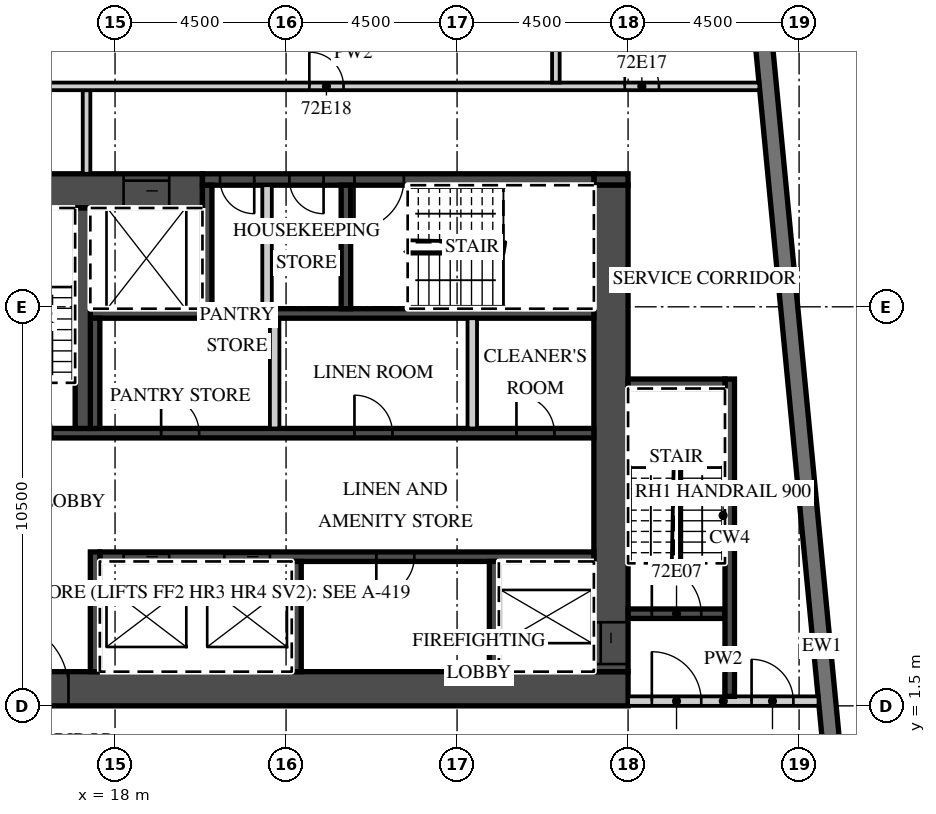
"""IFC4 building model, lengths in metres.
Left out: names, types, materials, properties, quantities, classifications, styles, units other than length and angle.
Written with IfcOpenShell. Run it as: python <this file> out.ifc"""

import sys

from ifc_helpers import new_model, si_unit, direction, frame, frame_2d, origin, place, context, subcontext, project, spatial, rectangle, extrude, element, fill, save


model = new_model("IFC4")
c1 = context("Model", 3, precision=1e-05, world=origin(), true_north=direction((0.0, 1.0)))
c2 = subcontext(c1, "Body", "Model", "MODEL_VIEW")
j1 = project(units=[si_unit("LENGTHUNIT", "METRE"), si_unit("PLANEANGLEUNIT", "RADIAN")], contexts=[c1])
p1 = place(None, origin())
s1 = spatial("IfcSite", under=j1, at=p1, CompositionType="ELEMENT")
p2 = place(p1, origin())
s2 = spatial("IfcBuilding", under=s1, at=p2, CompositionType="ELEMENT")
p3 = place(p2, frame((0.0, 0.0, 288.3)))
s3 = spatial("IfcBuildingStorey", under=s2, at=p3, CompositionType="ELEMENT", Elevation=288.3)
p4 = place(p3, frame((38.132, -12.858, 0.0), z_axis=(0.0, 0.0, 1.0), x_axis=(-0.095847749461, 0.995396006082, 0.0)))
e1 = element("IfcWall", 1, at=p4, inside=s3, PredefinedType="SOLIDWALL", context=c2, shape_type="SweptSolid", body=[
    extrude(rectangle(XDim=32.0, YDim=0.45, at=frame_2d((16.0, 0.0))), origin(), (0.0, 0.0, 1.0), 3.02),
])
p5 = place(p3, frame((13.5, 1.95, 0.0), z_axis=(0.0, 0.0, 1.0), x_axis=(1.0, 0.0, 0.0)))
e2 = element("IfcWall", 2, at=p5, inside=s3, PredefinedType="SHEAR", context=c2, shape_type="SweptSolid", body=[
    extrude(rectangle(XDim=18.0, YDim=0.9, at=frame_2d((9.0, 0.0))), origin(), (0.0, 0.0, 1.0), 3.02),
])
p6 = place(p5, frame((1.475, 0.0, 0.0)))
e3 = element("IfcOpeningElement", 3, at=p6, cuts=e2, PredefinedType="OPENING", context=c2, shape_type="SweptSolid", body=[
    extrude(rectangle(XDim=1.8, YDim=2.1, at=frame_2d((0.9, 1.05))), frame((0.0, 0.46, 0.0), z_axis=(0.0, -1.0, 0.0), x_axis=(1.0, 0.0, 0.0)), (0.0, 0.0, 1.0), 0.92),
])
p7 = place(p3, frame((13.5, 15.05, 0.0), z_axis=(0.0, 0.0, 1.0), x_axis=(1.0, 0.0, 0.0)))
e4 = element("IfcWall", 4, at=p7, inside=s3, PredefinedType="SHEAR", context=c2, shape_type="SweptSolid", body=[
    extrude(rectangle(XDim=6.8, YDim=0.9, at=frame_2d((3.4, 0.0))), origin(), (0.0, 0.0, 1.0), 3.02),
])
p8 = place(p7, frame((4.725, 0.0, 0.0)))
e5 = element("IfcOpeningElement", 5, at=p8, cuts=e4, PredefinedType="OPENING", context=c2, shape_type="SweptSolid", body=[
    extrude(rectangle(XDim=1.2, YDim=2.1, at=frame_2d((0.6, 1.05))), frame((0.0, 0.46, 0.0), z_axis=(0.0, -1.0, 0.0), x_axis=(1.0, 0.0, 0.0)), (0.0, 0.0, 1.0), 0.92),
])
p9 = place(p3, frame((30.6, 15.35, 0.0), z_axis=(0.0, 0.0, 1.0), x_axis=(1.0, 0.0, 0.0)))
e6 = element("IfcWall", 6, at=p9, inside=s3, PredefinedType="SHEAR", context=c2, shape_type="SweptSolid", body=[
    extrude(rectangle(XDim=0.9, YDim=0.3, at=frame_2d((0.45, 0.0))), origin(), (0.0, 0.0, 1.0), 3.02),
])
p10 = place(p3, frame((20.3, 15.35, 0.0), z_axis=(0.0, 0.0, 1.0), x_axis=(1.0, 0.0, 0.0)))
e7 = element("IfcWall", 7, at=p10, inside=s3, PredefinedType="SHEAR", context=c2, shape_type="SweptSolid", body=[
    extrude(rectangle(XDim=10.3, YDim=0.3, at=frame_2d((5.15, 0.0))), origin(), (0.0, 0.0, 1.0), 3.02),
])
p11 = place(p10, frame((4.0, 0.0, 0.0)))
e8 = element("IfcOpeningElement", 8, at=p11, cuts=e7, PredefinedType="OPENING", context=c2, shape_type="SweptSolid", body=[
    extrude(rectangle(XDim=1.3, YDim=2.1, at=frame_2d((0.65, 1.05))), frame((0.0, 0.16, 0.0), z_axis=(0.0, -1.0, 0.0), x_axis=(1.0, 0.0, 0.0)), (0.0, 0.0, 1.0), 0.32),
])
p12 = place(p10, frame((2.288, 0.0, 0.0)))
e9 = element("IfcOpeningElement", 9, at=p12, cuts=e7, PredefinedType="OPENING", context=c2, shape_type="SweptSolid", body=[
    extrude(rectangle(XDim=0.9, YDim=2.1, at=frame_2d((0.45, 1.05))), frame((0.0, 0.16, 0.0), z_axis=(0.0, -1.0, 0.0), x_axis=(1.0, 0.0, 0.0)), (0.0, 0.0, 1.0), 0.32),
])
p13 = place(p10, frame((0.462, 0.0, 0.0)))
e10 = element("IfcOpeningElement", 10, at=p13, cuts=e7, PredefinedType="OPENING", context=c2, shape_type="SweptSolid", body=[
    extrude(rectangle(XDim=0.9, YDim=2.1, at=frame_2d((0.45, 1.05))), frame((0.0, 0.16, 0.0), z_axis=(0.0, -1.0, 0.0), x_axis=(1.0, 0.0, 0.0)), (0.0, 0.0, 1.0), 0.32),
])
p14 = place(p3, frame((31.05, 2.4, 0.0), z_axis=(0.0, 0.0, 1.0), x_axis=(0.0, 1.0, 0.0)))
e11 = element("IfcWall", 11, at=p14, inside=s3, PredefinedType="SHEAR", context=c2, shape_type="SweptSolid", body=[
    extrude(rectangle(XDim=12.8, YDim=0.9, at=frame_2d((6.4, 0.0))), origin(), (0.0, 0.0, 1.0), 3.02),
])
p15 = place(p14, frame((0.2, 0.0, 0.0)))
e12 = element("IfcOpeningElement", 12, at=p15, cuts=e11, PredefinedType="OPENING", context=c2, shape_type="SweptSolid", body=[
    extrude(rectangle(XDim=1.1, YDim=2.1, at=frame_2d((0.55, 1.05))), frame((0.0, 0.46, 0.0), z_axis=(0.0, -1.0, 0.0), x_axis=(1.0, 0.0, 0.0)), (0.0, 0.0, 1.0), 0.92),
])
p16 = place(p3, frame((17.6, 5.425, 0.0), z_axis=(0.0, 0.0, 1.0), x_axis=(1.0, 0.0, 0.0)))
e13 = element("IfcWall", 13, at=p16, inside=s3, PredefinedType="SHEAR", context=c2, shape_type="SweptSolid", body=[
    extrude(rectangle(XDim=13.0, YDim=0.25, at=frame_2d((6.5, 0.0))), origin(), (0.0, 0.0, 1.0), 3.02),
])
p17 = place(p16, frame((3.275, 0.0, 0.0)))
e14 = element("IfcOpeningElement", 14, at=p17, cuts=e13, PredefinedType="OPENING", context=c2, shape_type="SweptSolid", body=[
    extrude(rectangle(XDim=1.2, YDim=2.1, at=frame_2d((0.6, 1.05))), frame((0.0, 0.135, 0.0), z_axis=(0.0, -1.0, 0.0), x_axis=(1.0, 0.0, 0.0)), (0.0, 0.0, 1.0), 0.27),
])
p18 = place(p16, frame((0.625, 0.0, 0.0)))
e15 = element("IfcOpeningElement", 15, at=p18, cuts=e13, PredefinedType="OPENING", context=c2, shape_type="SweptSolid", body=[
    extrude(rectangle(XDim=1.2, YDim=2.1, at=frame_2d((0.6, 1.05))), frame((0.0, 0.135, 0.0), z_axis=(0.0, -1.0, 0.0), x_axis=(1.0, 0.0, 0.0)), (0.0, 0.0, 1.0), 0.27),
])
p19 = place(p16, frame((7.275, 0.0, 0.0)))
e16 = element("IfcOpeningElement", 16, at=p19, cuts=e13, PredefinedType="OPENING", context=c2, shape_type="SweptSolid", body=[
    extrude(rectangle(XDim=1.0, YDim=2.1, at=frame_2d((0.5, 1.05))), frame((0.0, 0.135, 0.0), z_axis=(0.0, -1.0, 0.0), x_axis=(1.0, 0.0, 0.0)), (0.0, 0.0, 1.0), 0.27),
])
p20 = place(p3, frame((17.475, 2.4, 0.0), z_axis=(0.0, 0.0, 1.0), x_axis=(0.0, 1.0, 0.0)))
e17 = element("IfcWall", 17, at=p20, inside=s3, PredefinedType="SHEAR", context=c2, shape_type="SweptSolid", body=[
    extrude(rectangle(XDim=3.15, YDim=0.25, at=frame_2d((1.575, 0.0))), origin(), (0.0, 0.0, 1.0), 3.02),
])
for number, where, z_axis, x_axis in (
    (18, (27.975, 2.4, 0.0), (0.0, 0.0, 1.0), (0.0, 1.0, 0.0)),
    (19, (22.775, 2.4, 0.0), (0.0, 0.0, 1.0), (0.0, 1.0, 0.0)),
):
    element("IfcWall", number, at=place(p3, frame(where, z_axis=z_axis, x_axis=x_axis)), inside=s3, PredefinedType="SHEAR", context=c2, shape_type="SweptSolid", body=[
        extrude(rectangle(XDim=2.9, YDim=0.25, at=frame_2d((1.45, 0.0))), origin(), (0.0, 0.0, 1.0), 3.02),
    ])
p21 = place(p3, frame((14.4, 8.675, 0.0), z_axis=(0.0, 0.0, 1.0), x_axis=(1.0, 0.0, 0.0)))
e20 = element("IfcWall", 20, at=p21, inside=s3, PredefinedType="SHEAR", context=c2, shape_type="SweptSolid", body=[
    extrude(rectangle(XDim=16.2, YDim=0.25, at=frame_2d((8.1, 0.0))), origin(), (0.0, 0.0, 1.0), 3.02),
])
p22 = place(p21, frame((0.65, 0.0, 0.0)))
e21 = element("IfcOpeningElement", 21, at=p22, cuts=e20, PredefinedType="OPENING", context=c2, shape_type="SweptSolid", body=[
    extrude(rectangle(XDim=1.3, YDim=2.1, at=frame_2d((0.65, 1.05))), frame((0.0, 0.135, 0.0), z_axis=(0.0, -1.0, 0.0), x_axis=(1.0, 0.0, 0.0)), (0.0, 0.0, 1.0), 0.27),
])
p23 = place(p21, frame((14.163, 0.0, 0.0)))
e22 = element("IfcOpeningElement", 22, at=p23, cuts=e20, PredefinedType="OPENING", context=c2, shape_type="SweptSolid", body=[
    extrude(rectangle(XDim=1.0, YDim=2.1, at=frame_2d((0.5, 1.05))), frame((0.0, 0.135, 0.0), z_axis=(0.0, -1.0, 0.0), x_axis=(1.0, 0.0, 0.0)), (0.0, 0.0, 1.0), 0.27),
])
p24 = place(p21, frame((9.9, 0.0, 0.0)))
e23 = element("IfcOpeningElement", 23, at=p24, cuts=e20, PredefinedType="OPENING", context=c2, shape_type="SweptSolid", body=[
    extrude(rectangle(XDim=1.0, YDim=2.1, at=frame_2d((0.5, 1.05))), frame((0.0, 0.135, 0.0), z_axis=(0.0, -1.0, 0.0), x_axis=(1.0, 0.0, 0.0)), (0.0, 0.0, 1.0), 0.27),
])
p25 = place(p21, frame((4.812, 0.0, 0.0)))
e24 = element("IfcOpeningElement", 24, at=p25, cuts=e20, PredefinedType="OPENING", context=c2, shape_type="SweptSolid", body=[
    extrude(rectangle(XDim=1.0, YDim=2.1, at=frame_2d((0.5, 1.05))), frame((0.0, 0.135, 0.0), z_axis=(0.0, -1.0, 0.0), x_axis=(1.0, 0.0, 0.0)), (0.0, 0.0, 1.0), 0.27),
])
p26 = place(p3, frame((17.35, 11.825, 0.0), z_axis=(0.0, 0.0, 1.0), x_axis=(1.0, 0.0, 0.0)))
e25 = element("IfcWall", 25, at=p26, inside=s3, PredefinedType="SHEAR", context=c2, shape_type="SweptSolid", body=[
    extrude(rectangle(XDim=13.25, YDim=0.25, at=frame_2d((6.625, 0.0))), origin(), (0.0, 0.0, 1.0), 3.02),
])
p27 = place(p3, frame((17.475, 8.8, 0.0), z_axis=(0.0, 0.0, 1.0), x_axis=(0.0, 1.0, 0.0)))
e26 = element("IfcWall", 26, at=p27, inside=s3, PredefinedType="SHEAR", context=c2, shape_type="SweptSolid", body=[
    extrude(rectangle(XDim=2.9, YDim=0.25, at=frame_2d((1.45, 0.0))), origin(), (0.0, 0.0, 1.0), 3.02),
])
for number, where, z_axis, x_axis in (
    (27, (27.4, 8.8, 0.0), (0.0, 0.0, 1.0), (0.0, 1.0, 0.0)),
    (28, (22.2, 8.8, 0.0), (0.0, 0.0, 1.0), (0.0, 1.0, 0.0)),
):
    element("IfcWall", number, at=place(p3, frame(where, z_axis=z_axis, x_axis=x_axis)), inside=s3, PredefinedType="PARTITIONING", context=c2, shape_type="SweptSolid", body=[
        extrude(rectangle(XDim=2.9, YDim=0.25, at=frame_2d((1.45, 0.0))), origin(), (0.0, 0.0, 1.0), 3.02),
    ])
p28 = place(p3, frame((17.15, 8.8, 0.0), z_axis=(0.0, 0.0, 1.0), x_axis=(0.0, 1.0, 0.0)))
e29 = element("IfcWall", 29, at=p28, inside=s3, PredefinedType="SHEAR", context=c2, shape_type="SweptSolid", body=[
    extrude(rectangle(XDim=5.8, YDim=0.4, at=frame_2d((2.9, 0.0))), origin(), (0.0, 0.0, 1.0), 3.02),
])
for number, where, z_axis, x_axis in (
    (30, (20.425, 11.95, 0.0), (0.0, 0.0, 1.0), (0.0, 1.0, 0.0)),
    (31, (24.075, 11.95, 0.0), (0.0, 0.0, 1.0), (0.0, 1.0, 0.0)),
):
    element("IfcWall", number, at=place(p3, frame(where, z_axis=z_axis, x_axis=x_axis)), inside=s3, PredefinedType="SHEAR", context=c2, shape_type="SweptSolid", body=[
        extrude(rectangle(XDim=3.25, YDim=0.25, at=frame_2d((1.625, 0.0))), origin(), (0.0, 0.0, 1.0), 3.02),
    ])
p29 = place(p3, frame((22.0, 11.95, 0.0), z_axis=(0.0, 0.0, 1.0), x_axis=(0.0, 1.0, 0.0)))
e32 = element("IfcWall", 32, at=p29, inside=s3, PredefinedType="PARTITIONING", context=c2, shape_type="SweptSolid", body=[
    extrude(rectangle(XDim=3.25, YDim=0.25, at=frame_2d((1.625, 0.0))), origin(), (0.0, 0.0, 1.0), 3.02),
])
p30 = place(p3, frame((31.5, 1.625, 0.0), z_axis=(0.0, 0.0, 1.0), x_axis=(1.0, 0.0, 0.0)))
e33 = element("IfcWall", 33, at=p30, inside=s3, PredefinedType="PARTITIONING", context=c2, shape_type="SweptSolid", body=[
    extrude(rectangle(XDim=5.012, YDim=0.25, at=frame_2d((2.506, 0.0))), origin(), (0.0, 0.0, 1.0), 3.02),
])
p31 = place(p30, frame((0.625, 0.0, 0.0)))
e34 = element("IfcOpeningElement", 34, at=p31, cuts=e33, PredefinedType="OPENING", context=c2, shape_type="SweptSolid", body=[
    extrude(rectangle(XDim=1.3, YDim=2.1, at=frame_2d((0.65, 1.05))), frame((0.0, 0.135, 0.0), z_axis=(0.0, -1.0, 0.0), x_axis=(1.0, 0.0, 0.0)), (0.0, 0.0, 1.0), 0.27),
])
p32 = place(p30, frame((3.25, 0.0, 0.0)))
e35 = element("IfcOpeningElement", 35, at=p32, cuts=e33, PredefinedType="OPENING", context=c2, shape_type="SweptSolid", body=[
    extrude(rectangle(XDim=1.1, YDim=2.1, at=frame_2d((0.55, 1.05))), frame((0.0, 0.135, 0.0), z_axis=(0.0, -1.0, 0.0), x_axis=(1.0, 0.0, 0.0)), (0.0, 0.0, 1.0), 0.27),
])
p33 = place(p3, frame((31.5, 3.925, 0.0), z_axis=(0.0, 0.0, 1.0), x_axis=(1.0, 0.0, 0.0)))
e36 = element("IfcWall", 36, at=p33, inside=s3, PredefinedType="SHEAR", context=c2, shape_type="SweptSolid", body=[
    extrude(rectangle(XDim=2.55, YDim=0.25, at=frame_2d((1.275, 0.0))), origin(), (0.0, 0.0, 1.0), 3.02),
])
p34 = place(p33, frame((0.625, 0.0, 0.0)))
e37 = element("IfcOpeningElement", 37, at=p34, cuts=e36, PredefinedType="OPENING", context=c2, shape_type="SweptSolid", body=[
    extrude(rectangle(XDim=1.3, YDim=2.1, at=frame_2d((0.65, 1.05))), frame((0.0, 0.135, 0.0), z_axis=(0.0, -1.0, 0.0), x_axis=(1.0, 0.0, 0.0)), (0.0, 0.0, 1.0), 0.27),
])
p35 = place(p3, frame((34.175, 1.75, 0.0), z_axis=(0.0, 0.0, 1.0), x_axis=(0.0, 1.0, 0.0)))
e38 = element("IfcWall", 38, at=p35, inside=s3, PredefinedType="SHEAR", context=c2, shape_type="SweptSolid", body=[
    extrude(rectangle(XDim=8.35, YDim=0.25, at=frame_2d((4.175, 0.0))), origin(), (0.0, 0.0, 1.0), 3.02),
])
p36 = place(p3, frame((31.5, 9.975, 0.0), z_axis=(0.0, 0.0, 1.0), x_axis=(1.0, 0.0, 0.0)))
e39 = element("IfcWall", 39, at=p36, inside=s3, PredefinedType="SHEAR", context=c2, shape_type="SweptSolid", body=[
    extrude(rectangle(XDim=2.55, YDim=0.25, at=frame_2d((1.275, 0.0))), origin(), (0.0, 0.0, 1.0), 3.02),
])
p37 = place(p3, frame((17.25, 15.5, 0.0), z_axis=(0.0, 0.0, 1.0), x_axis=(0.0, 1.0, 0.0)))
e40 = element("IfcWall", 40, at=p37, inside=s3, PredefinedType="PARTITIONING", context=c2, shape_type="SweptSolid", body=[
    extrude(rectangle(XDim=2.2, YDim=0.2, at=frame_2d((1.1, 0.0))), origin(), (0.0, 0.0, 1.0), 3.02),
])
p38 = place(p3, frame((13.6, 17.8, 0.0), z_axis=(0.0, 0.0, 1.0), x_axis=(1.0, 0.0, 0.0)))
e41 = element("IfcWall", 41, at=p38, inside=s3, PredefinedType="PARTITIONING", context=c2, shape_type="SweptSolid", body=[
    extrude(rectangle(XDim=21.354, YDim=0.2, at=frame_2d((10.677, 0.0))), origin(), (0.0, 0.0, 1.0), 3.02),
])
p39 = place(p38, frame((17.812, 0.0, 0.0)))
e42 = element("IfcOpeningElement", 42, at=p39, cuts=e41, PredefinedType="OPENING", context=c2, shape_type="SweptSolid", body=[
    extrude(rectangle(XDim=0.9, YDim=2.1, at=frame_2d((0.45, 1.05))), frame((0.0, 0.11, 0.0), z_axis=(0.0, -1.0, 0.0), x_axis=(1.0, 0.0, 0.0)), (0.0, 0.0, 1.0), 0.22),
])
p40 = place(p38, frame((9.512, 0.0, 0.0)))
e43 = element("IfcOpeningElement", 43, at=p40, cuts=e41, PredefinedType="OPENING", context=c2, shape_type="SweptSolid", body=[
    extrude(rectangle(XDim=0.9, YDim=2.1, at=frame_2d((0.45, 1.05))), frame((0.0, 0.11, 0.0), z_axis=(0.0, -1.0, 0.0), x_axis=(1.0, 0.0, 0.0)), (0.0, 0.0, 1.0), 0.22),
])
p41 = place(p3, frame((29.6, 17.9, 0.0), z_axis=(0.0, 0.0, 1.0), x_axis=(0.0, 1.0, 0.0)))
e44 = element("IfcWall", 44, at=p41, inside=s3, PredefinedType="PARTITIONING", context=c2, shape_type="SweptSolid", body=[
    extrude(rectangle(XDim=4.136, YDim=0.2, at=frame_2d((2.068, 0.0))), origin(), (0.0, 0.0, 1.0), 3.02),
])
p42 = place(p17, origin())
e45 = element("IfcDoor", 45, at=p42, inside=s3, OperationType="SLIDING_TO_RIGHT", PredefinedType="DOOR", context=c2, shape_type="SweptSolid", body=[
    extrude(rectangle(XDim=1.2, YDim=2.1, at=frame_2d((0.6, 1.05))), frame((0.0, 0.025, 0.0), z_axis=(0.0, -1.0, 0.0), x_axis=(1.0, 0.0, 0.0)), (0.0, 0.0, 1.0), 0.05),
])
fill(e14, e45)
p43 = place(p18, origin())
e46 = element("IfcDoor", 46, at=p43, inside=s3, OperationType="SLIDING_TO_LEFT", PredefinedType="DOOR", context=c2, shape_type="SweptSolid", body=[
    extrude(rectangle(XDim=1.2, YDim=2.1, at=frame_2d((0.6, 1.05))), frame((0.0, 0.025, 0.0), z_axis=(0.0, -1.0, 0.0), x_axis=(1.0, 0.0, 0.0)), (0.0, 0.0, 1.0), 0.05),
])
fill(e15, e46)
p44 = place(p8, origin())
e47 = element("IfcDoor", 47, at=p44, inside=s3, OperationType="SLIDING_TO_LEFT", PredefinedType="DOOR", context=c2, shape_type="SweptSolid", body=[
    extrude(rectangle(XDim=1.2, YDim=2.1, at=frame_2d((0.6, 1.05))), frame((0.0, 0.025, 0.0), z_axis=(0.0, -1.0, 0.0), x_axis=(1.0, 0.0, 0.0)), (0.0, 0.0, 1.0), 0.05),
])
fill(e5, e47)
p45 = place(p15, origin())
e48 = element("IfcDoor", 48, at=p45, inside=s3, OperationType="SLIDING_TO_LEFT", PredefinedType="DOOR", context=c2, shape_type="SweptSolid", body=[
    extrude(rectangle(XDim=1.1, YDim=2.1, at=frame_2d((0.55, 1.05))), frame((0.0, 0.025, 0.0), z_axis=(0.0, -1.0, 0.0), x_axis=(1.0, 0.0, 0.0)), (0.0, 0.0, 1.0), 0.05),
])
fill(e12, e48)
p46 = place(p6, origin())
e49 = element("IfcDoor", 49, at=p46, inside=s3, OperationType="DOUBLE_DOOR_DOUBLE_SWING", PredefinedType="DOOR", context=c2, shape_type="SweptSolid", body=[
    extrude(rectangle(XDim=1.8, YDim=2.1, at=frame_2d((0.9, 1.05))), frame((0.0, 0.025, 0.0), z_axis=(0.0, -1.0, 0.0), x_axis=(1.0, 0.0, 0.0)), (0.0, 0.0, 1.0), 0.05),
])
fill(e3, e49)
p47 = place(p31, origin())
e50 = element("IfcDoor", 50, at=p47, inside=s3, OperationType="SINGLE_SWING_LEFT", PredefinedType="DOOR", context=c2, shape_type="SweptSolid", body=[
    extrude(rectangle(XDim=1.3, YDim=2.1, at=frame_2d((0.65, 1.05))), frame((0.0, 0.025, 0.0), z_axis=(0.0, -1.0, 0.0), x_axis=(1.0, 0.0, 0.0)), (0.0, 0.0, 1.0), 0.05),
])
fill(e34, e50)
p48 = place(p34, origin())
e51 = element("IfcDoor", 51, at=p48, inside=s3, OperationType="SINGLE_SWING_LEFT", PredefinedType="DOOR", context=c2, shape_type="SweptSolid", body=[
    extrude(rectangle(XDim=1.3, YDim=2.1, at=frame_2d((0.65, 1.05))), frame((0.0, 0.025, 0.0), z_axis=(0.0, -1.0, 0.0), x_axis=(1.0, 0.0, 0.0)), (0.0, 0.0, 1.0), 0.05),
])
fill(e37, e51)
p49 = place(p32, origin())
e52 = element("IfcDoor", 52, at=p49, inside=s3, OperationType="SINGLE_SWING_LEFT", PredefinedType="DOOR", context=c2, shape_type="SweptSolid", body=[
    extrude(rectangle(XDim=1.1, YDim=2.1, at=frame_2d((0.55, 1.05))), frame((0.0, 0.025, 0.0), z_axis=(0.0, -1.0, 0.0), x_axis=(1.0, 0.0, 0.0)), (0.0, 0.0, 1.0), 0.05),
])
fill(e35, e52)
p50 = place(p11, origin())
e53 = element("IfcDoor", 53, at=p50, inside=s3, OperationType="SINGLE_SWING_LEFT", PredefinedType="DOOR", context=c2, shape_type="SweptSolid", body=[
    extrude(rectangle(XDim=1.3, YDim=2.1, at=frame_2d((0.65, 1.05))), frame((0.0, 0.025, 0.0), z_axis=(0.0, -1.0, 0.0), x_axis=(1.0, 0.0, 0.0)), (0.0, 0.0, 1.0), 0.05),
])
fill(e8, e53)
p51 = place(p12, origin())
e54 = element("IfcDoor", 54, at=p51, inside=s3, OperationType="SINGLE_SWING_RIGHT", PredefinedType="DOOR", context=c2, shape_type="SweptSolid", body=[
    extrude(rectangle(XDim=0.9, YDim=2.1, at=frame_2d((0.45, 1.05))), frame((0.0, 0.025, 0.0), z_axis=(0.0, -1.0, 0.0), x_axis=(1.0, 0.0, 0.0)), (0.0, 0.0, 1.0), 0.05),
])
fill(e9, e54)
p52 = place(p13, origin())
e55 = element("IfcDoor", 55, at=p52, inside=s3, OperationType="SINGLE_SWING_RIGHT", PredefinedType="DOOR", context=c2, shape_type="SweptSolid", body=[
    extrude(rectangle(XDim=0.9, YDim=2.1, at=frame_2d((0.45, 1.05))), frame((0.0, 0.025, 0.0), z_axis=(0.0, -1.0, 0.0), x_axis=(1.0, 0.0, 0.0)), (0.0, 0.0, 1.0), 0.05),
])
fill(e10, e55)
p53 = place(p23, origin())
e56 = element("IfcDoor", 56, at=p53, inside=s3, OperationType="SINGLE_SWING_LEFT", PredefinedType="DOOR", context=c2, shape_type="SweptSolid", body=[
    extrude(rectangle(XDim=1.0, YDim=2.1, at=frame_2d((0.5, 1.05))), frame((0.0, 0.025, 0.0), z_axis=(0.0, -1.0, 0.0), x_axis=(1.0, 0.0, 0.0)), (0.0, 0.0, 1.0), 0.05),
])
fill(e22, e56)
p54 = place(p24, origin())
e57 = element("IfcDoor", 57, at=p54, inside=s3, OperationType="SINGLE_SWING_LEFT", PredefinedType="DOOR", context=c2, shape_type="SweptSolid", body=[
    extrude(rectangle(XDim=1.0, YDim=2.1, at=frame_2d((0.5, 1.05))), frame((0.0, 0.025, 0.0), z_axis=(0.0, -1.0, 0.0), x_axis=(1.0, 0.0, 0.0)), (0.0, 0.0, 1.0), 0.05),
])
fill(e23, e57)
p55 = place(p25, origin())
e58 = element("IfcDoor", 58, at=p55, inside=s3, OperationType="SINGLE_SWING_LEFT", PredefinedType="DOOR", context=c2, shape_type="SweptSolid", body=[
    extrude(rectangle(XDim=1.0, YDim=2.1, at=frame_2d((0.5, 1.05))), frame((0.0, 0.025, 0.0), z_axis=(0.0, -1.0, 0.0), x_axis=(1.0, 0.0, 0.0)), (0.0, 0.0, 1.0), 0.05),
])
fill(e24, e58)
p56 = place(p19, origin())
e59 = element("IfcDoor", 59, at=p56, inside=s3, OperationType="SINGLE_SWING_LEFT", PredefinedType="DOOR", context=c2, shape_type="SweptSolid", body=[
    extrude(rectangle(XDim=1.0, YDim=2.1, at=frame_2d((0.5, 1.05))), frame((0.0, 0.025, 0.0), z_axis=(0.0, -1.0, 0.0), x_axis=(1.0, 0.0, 0.0)), (0.0, 0.0, 1.0), 0.05),
])
fill(e16, e59)
p57 = place(p39, origin())
e60 = element("IfcDoor", 60, at=p57, inside=s3, OperationType="SINGLE_SWING_LEFT", PredefinedType="DOOR", context=c2, shape_type="SweptSolid", body=[
    extrude(rectangle(XDim=0.9, YDim=2.1, at=frame_2d((0.45, 1.05))), frame((0.0, 0.025, 0.0), z_axis=(0.0, -1.0, 0.0), x_axis=(1.0, 0.0, 0.0)), (0.0, 0.0, 1.0), 0.05),
])
fill(e42, e60)
p58 = place(p40, origin())
e61 = element("IfcDoor", 61, at=p58, inside=s3, OperationType="SINGLE_SWING_LEFT", PredefinedType="DOOR", context=c2, shape_type="SweptSolid", body=[
    extrude(rectangle(XDim=0.9, YDim=2.1, at=frame_2d((0.45, 1.05))), frame((0.0, 0.025, 0.0), z_axis=(0.0, -1.0, 0.0), x_axis=(1.0, 0.0, 0.0)), (0.0, 0.0, 1.0), 0.05),
])
fill(e43, e61)
save(model, sys.argv[1])
